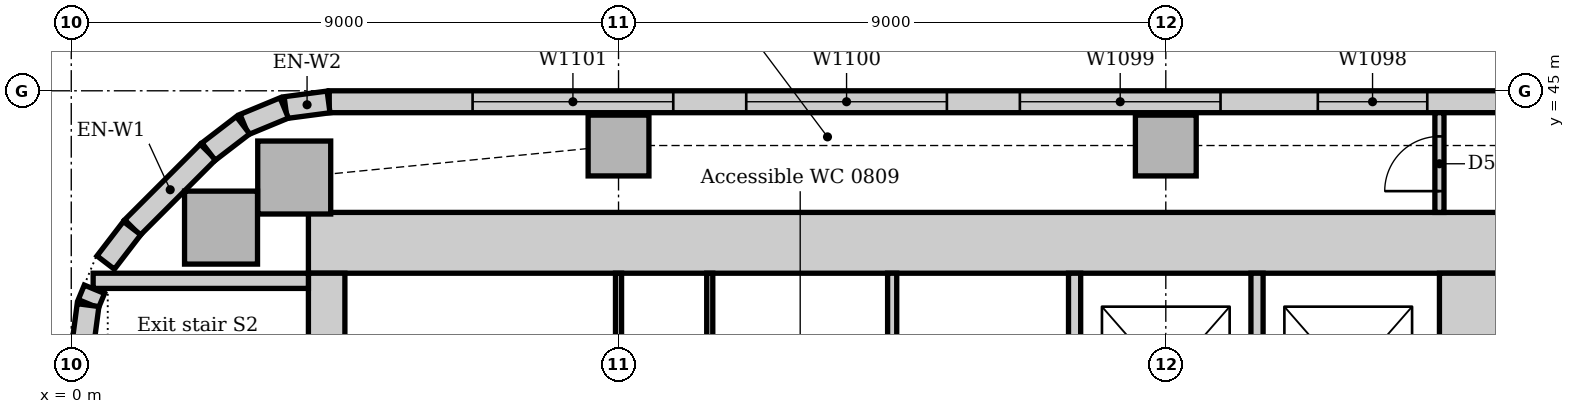
"""IFC4 building model, lengths in metres.
Left out: names, types, materials, properties, quantities, classifications, styles, units other than length and angle.
Written with IfcOpenShell. Run it as: python <this file> out.ifc"""

import sys

from ifc_helpers import new_model, si_unit, direction, frame, frame_2d, origin, origin_2d, place, context, subcontext, project, spatial, rectangle, extrude, element, fill, save


model = new_model("IFC4")
c1 = context("Model", 3, precision=1e-05, world=origin(), true_north=direction((0.0, 1.0)))
c2 = subcontext(c1, "Body", "Model", "MODEL_VIEW")
j1 = project(units=[si_unit("LENGTHUNIT", "METRE"), si_unit("PLANEANGLEUNIT", "RADIAN")], contexts=[c1])
p1 = place(None, origin())
s1 = spatial("IfcSite", under=j1, at=p1, CompositionType="ELEMENT")
p2 = place(p1, origin())
s2 = spatial("IfcBuilding", under=s1, at=p2, CompositionType="ELEMENT")
p3 = place(p2, frame((0.0, 0.0, 38.0)))
s3 = spatial("IfcBuildingStorey", under=s2, at=p3, CompositionType="ELEMENT", Elevation=38.0)
p4 = place(p3, frame((23.5, 42.5, 0.0), z_axis=(0.0, 0.0, 1.0), x_axis=(-1.0, 0.0, 0.0)))
e1 = element("IfcWall", 1, at=p4, inside=s3, PredefinedType="SOLIDWALL", context=c2, shape_type="SweptSolid", body=[
    extrude(rectangle(XDim=19.6, YDim=1.0, at=frame_2d((9.8, 0.0))), origin(), (0.0, 0.0, 1.0), 4.0),
])
p5 = place(p3, frame((23.0, 31.5, 0.0), z_axis=(0.0, 0.0, 1.0), x_axis=(0.0, 1.0, 0.0)))
e2 = element("IfcWall", 2, at=p5, inside=s3, PredefinedType="SOLIDWALL", context=c2, shape_type="SweptSolid", body=[
    extrude(rectangle(XDim=10.5, YDim=1.0, at=frame_2d((5.25, 0.0))), origin(), (0.0, 0.0, 1.0), 4.0),
])
p6 = place(p5, frame((3.15, 0.0, 0.0)))
e3 = element("IfcOpeningElement", 3, at=p6, cuts=e2, PredefinedType="OPENING", context=c2, shape_type="SweptSolid", body=[
    extrude(rectangle(XDim=1.0, YDim=2.1, at=frame_2d((0.5, 1.05))), frame((0.0, 0.51, 0.0), z_axis=(0.0, -1.0, 0.0), x_axis=(1.0, 0.0, 0.0)), (0.0, 0.0, 1.0), 1.02),
])
p7 = place(p5, frame((5.2, 0.0, 0.0)))
e4 = element("IfcOpeningElement", 4, at=p7, cuts=e2, PredefinedType="OPENING", context=c2, shape_type="SweptSolid", body=[
    extrude(rectangle(XDim=1.0, YDim=2.1, at=frame_2d((0.5, 1.05))), frame((0.0, 0.51, 0.0), z_axis=(0.0, -1.0, 0.0), x_axis=(1.0, 0.0, 0.0)), (0.0, 0.0, 1.0), 1.02),
])
p8 = place(p3, frame((4.2, 42.0, 0.0), z_axis=(0.0, 0.0, 1.0), x_axis=(0.0, -1.0, 0.0)))
e5 = element("IfcWall", 5, at=p8, inside=s3, PredefinedType="SOLIDWALL", context=c2, shape_type="SweptSolid", body=[
    extrude(rectangle(XDim=10.5, YDim=0.6, at=frame_2d((5.25, 0.0))), origin(), (0.0, 0.0, 1.0), 4.0),
])
p9 = place(p8, frame((5.3, 0.0, 0.0)))
e6 = element("IfcOpeningElement", 6, at=p9, cuts=e5, PredefinedType="OPENING", context=c2, shape_type="SweptSolid", body=[
    extrude(rectangle(XDim=1.0, YDim=2.1, at=frame_2d((0.5, 1.05))), frame((0.0, 0.31, 0.0), z_axis=(0.0, -1.0, 0.0), x_axis=(1.0, 0.0, 0.0)), (0.0, 0.0, 1.0), 0.62),
])
p10 = place(p3, frame((3.9, 41.875, 0.0), z_axis=(0.0, 0.0, 1.0), x_axis=(-1.0, 0.0, 0.0)))
e7 = element("IfcWall", 7, at=p10, inside=s3, PredefinedType="SOLIDWALL", context=c2, shape_type="SweptSolid", body=[
    extrude(rectangle(XDim=3.54, YDim=0.25, at=frame_2d((1.77, 0.0))), origin(), (0.0, 0.0, 1.0), 4.0),
])
for number, where, z_axis, x_axis in (
    (8, (3.667, 43.574, 0.0), (0.0, 0.0, 1.0), (1.0, 0.0, 0.0)),
    (9, (2.463, 42.75, 0.0), (0.0, 0.0, 1.0), (1.0, 0.0, 0.0)),
):
    element("IfcColumn", number, at=place(p3, frame(where, z_axis=z_axis, x_axis=x_axis)), inside=s3, PredefinedType="COLUMN", context=c2, shape_type="SweptSolid", body=[
        extrude(rectangle(XDim=1.2, YDim=1.2, at=origin_2d()), origin(), (0.0, 0.0, 1.0), 3.85),
    ])
for number, where, z_axis, x_axis in (
    (10, (9.0, 44.1, 0.0), (0.0, 0.0, 1.0), (1.0, 0.0, 0.0)),
    (11, (18.0, 44.1, 0.0), (0.0, 0.0, 1.0), (1.0, 0.0, 0.0)),
):
    element("IfcColumn", number, at=place(p3, frame(where, z_axis=z_axis, x_axis=x_axis)), inside=s3, PredefinedType="COLUMN", context=c2, shape_type="SweptSolid", body=[
        extrude(rectangle(XDim=1.0, YDim=1.0, at=origin_2d()), origin(), (0.0, 0.0, 1.0), 3.85),
    ])
p11 = place(p3, frame((48.257, 44.82, 0.0), z_axis=(0.0, 0.0, 1.0), x_axis=(-1.0, 0.0, 0.0)))
e12 = element("IfcWall", 12, at=p11, inside=s3, PredefinedType="STANDARD", context=c2, shape_type="SweptSolid", body=[
    extrude(rectangle(XDim=44.015, YDim=0.36, at=frame_2d((22.007, 0.0))), origin(), (0.0, 0.0, 1.0), 3.85),
])
p12 = place(p11, frame((2.357, 0.0, 0.9)))
e13 = element("IfcOpeningElement", 13, at=p12, cuts=e12, PredefinedType="OPENING", context=c2, shape_type="SweptSolid", body=[
    extrude(rectangle(XDim=3.3, YDim=1.6, at=frame_2d((1.65, 0.8))), frame((0.0, 0.19, 0.0), z_axis=(0.0, -1.0, 0.0), x_axis=(1.0, 0.0, 0.0)), (0.0, 0.0, 1.0), 0.38),
])
p13 = place(p11, frame((6.857, 0.0, 0.9)))
e14 = element("IfcOpeningElement", 14, at=p13, cuts=e12, PredefinedType="OPENING", context=c2, shape_type="SweptSolid", body=[
    extrude(rectangle(XDim=3.3, YDim=1.6, at=frame_2d((1.65, 0.8))), frame((0.0, 0.19, 0.0), z_axis=(0.0, -1.0, 0.0), x_axis=(1.0, 0.0, 0.0)), (0.0, 0.0, 1.0), 0.38),
])
p14 = place(p11, frame((11.357, 0.0, 0.9)))
e15 = element("IfcOpeningElement", 15, at=p14, cuts=e12, PredefinedType="OPENING", context=c2, shape_type="SweptSolid", body=[
    extrude(rectangle(XDim=3.3, YDim=1.6, at=frame_2d((1.65, 0.8))), frame((0.0, 0.19, 0.0), z_axis=(0.0, -1.0, 0.0), x_axis=(1.0, 0.0, 0.0)), (0.0, 0.0, 1.0), 0.38),
])
p15 = place(p11, frame((15.857, 0.0, 0.9)))
e16 = element("IfcOpeningElement", 16, at=p15, cuts=e12, PredefinedType="OPENING", context=c2, shape_type="SweptSolid", body=[
    extrude(rectangle(XDim=3.3, YDim=1.6, at=frame_2d((1.65, 0.8))), frame((0.0, 0.19, 0.0), z_axis=(0.0, -1.0, 0.0), x_axis=(1.0, 0.0, 0.0)), (0.0, 0.0, 1.0), 0.38),
])
p16 = place(p11, frame((20.357, 0.0, 0.9)))
e17 = element("IfcOpeningElement", 17, at=p16, cuts=e12, PredefinedType="OPENING", context=c2, shape_type="SweptSolid", body=[
    extrude(rectangle(XDim=3.3, YDim=1.6, at=frame_2d((1.65, 0.8))), frame((0.0, 0.19, 0.0), z_axis=(0.0, -1.0, 0.0), x_axis=(1.0, 0.0, 0.0)), (0.0, 0.0, 1.0), 0.38),
])
p17 = place(p11, frame((25.957, 0.0, 0.9)))
e18 = element("IfcOpeningElement", 18, at=p17, cuts=e12, PredefinedType="OPENING", context=c2, shape_type="SweptSolid", body=[
    extrude(rectangle(XDim=1.8, YDim=1.6, at=frame_2d((0.9, 0.8))), frame((0.0, 0.19, 0.0), z_axis=(0.0, -1.0, 0.0), x_axis=(1.0, 0.0, 0.0)), (0.0, 0.0, 1.0), 0.38),
])
p18 = place(p11, frame((29.357, 0.0, 0.9)))
e19 = element("IfcOpeningElement", 19, at=p18, cuts=e12, PredefinedType="OPENING", context=c2, shape_type="SweptSolid", body=[
    extrude(rectangle(XDim=3.3, YDim=1.6, at=frame_2d((1.65, 0.8))), frame((0.0, 0.19, 0.0), z_axis=(0.0, -1.0, 0.0), x_axis=(1.0, 0.0, 0.0)), (0.0, 0.0, 1.0), 0.38),
])
p19 = place(p11, frame((33.857, 0.0, 0.9)))
e20 = element("IfcOpeningElement", 20, at=p19, cuts=e12, PredefinedType="OPENING", context=c2, shape_type="SweptSolid", body=[
    extrude(rectangle(XDim=3.3, YDim=1.6, at=frame_2d((1.65, 0.8))), frame((0.0, 0.19, 0.0), z_axis=(0.0, -1.0, 0.0), x_axis=(1.0, 0.0, 0.0)), (0.0, 0.0, 1.0), 0.38),
])
p20 = place(p11, frame((38.357, 0.0, 0.9)))
e21 = element("IfcOpeningElement", 21, at=p20, cuts=e12, PredefinedType="OPENING", context=c2, shape_type="SweptSolid", body=[
    extrude(rectangle(XDim=3.3, YDim=1.6, at=frame_2d((1.65, 0.8))), frame((0.0, 0.19, 0.0), z_axis=(0.0, -1.0, 0.0), x_axis=(1.0, 0.0, 0.0)), (0.0, 0.0, 1.0), 0.38),
])
p21 = place(p3, frame((2.249, 43.994, 0.0), z_axis=(0.0, 0.0, 1.0), x_axis=(-0.707106781187, -0.707106781187, 0.0)))
e22 = element("IfcWall", 22, at=p21, inside=s3, PredefinedType="STANDARD", context=c2, shape_type="SweptSolid", body=[
    extrude(rectangle(XDim=1.757, YDim=0.36, at=frame_2d((0.879, 0.0))), origin(), (0.0, 0.0, 1.0), 3.85),
])
for number, where, z_axis, x_axis in (
    (23, (4.231, 44.817, 0.0), (0.0, 0.0, 1.0), (-0.991, -0.131, 0.0)),
    (24, (3.503, 44.718, 0.0), (0.0, 0.0, 1.0), (-0.924, -0.383, 0.0)),
):
    element("IfcWall", number, at=place(p3, frame(where, z_axis=z_axis, x_axis=x_axis)), inside=s3, PredefinedType="STANDARD", context=c2, shape_type="SweptSolid", body=[
        extrude(rectangle(XDim=0.713, YDim=0.36, at=frame_2d((0.356, 0.0))), origin(), (0.0, 0.0, 1.0), 3.85),
    ])
for number, where, z_axis, x_axis in (
    (25, (2.825, 44.434, 0.0), (0.0, 0.0, 1.0), (-0.793, -0.609, 0.0)),
    (26, (1.0, 42.741, 0.0), (0.0, 0.0, 1.0), (-0.609, -0.793, 0.0)),
):
    element("IfcWall", number, at=place(p3, frame(where, z_axis=z_axis, x_axis=x_axis)), inside=s3, PredefinedType="STANDARD", context=c2, shape_type="SweptSolid", body=[
        extrude(rectangle(XDim=0.713, YDim=0.36, at=frame_2d((0.357, 0.0))), origin(), (0.0, 0.0, 1.0), 3.85),
    ])
p22 = place(p3, frame((0.381, 41.736, 0.0), z_axis=(0.0, 0.0, 1.0), x_axis=(-0.382773360986, -0.923842277729, 0.0)))
e27 = element("IfcWall", 27, at=p22, inside=s3, PredefinedType="STANDARD", context=c2, shape_type="SweptSolid", body=[
    extrude(rectangle(XDim=0.258, YDim=0.36, at=frame_2d((0.129, 0.0))), origin(), (0.0, 0.0, 1.0), 3.85),
])
p23 = place(p3, frame((0.276, 41.476, 0.0), z_axis=(0.0, 0.0, 1.0), x_axis=(-0.13055608231, -0.99144092581, 0.0)))
e28 = element("IfcWall", 28, at=p23, inside=s3, PredefinedType="STANDARD", context=c2, shape_type="SweptSolid", body=[
    extrude(rectangle(XDim=0.713, YDim=0.36, at=frame_2d((0.356, 0.0))), origin(), (0.0, 0.0, 1.0), 3.85),
])
for number, where, z_axis, x_axis in (
    (29, (16.5, 38.6, 0.0), (0.0, 0.0, 1.0), (0.0, 1.0, 0.0)),
    (30, (19.5, 38.6, 0.0), (0.0, 0.0, 1.0), (0.0, 1.0, 0.0)),
):
    element("IfcWall", number, at=place(p3, frame(where, z_axis=z_axis, x_axis=x_axis)), inside=s3, PredefinedType="PARTITIONING", context=c2, shape_type="SweptSolid", body=[
        extrude(rectangle(XDim=3.4, YDim=0.2, at=frame_2d((1.7, 0.0))), origin(), (0.0, 0.0, 1.0), 3.85),
    ])
p24 = place(p3, frame((22.5, 43.0, 0.0), z_axis=(0.0, 0.0, 1.0), x_axis=(0.0, 1.0, 0.0)))
e31 = element("IfcWall", 31, at=p24, inside=s3, PredefinedType="PARTITIONING", context=c2, shape_type="SweptSolid", body=[
    extrude(rectangle(XDim=1.64, YDim=0.15, at=frame_2d((0.82, 0.0))), origin(), (0.0, 0.0, 1.0), 3.85),
])
p25 = place(p24, frame((0.35, 0.0, 0.0)))
e32 = element("IfcOpeningElement", 32, at=p25, cuts=e31, PredefinedType="OPENING", context=c2, shape_type="SweptSolid", body=[
    extrude(rectangle(XDim=0.9, YDim=2.1, at=frame_2d((0.45, 1.05))), frame((0.0, 0.085, 0.0), z_axis=(0.0, -1.0, 0.0), x_axis=(1.0, 0.0, 0.0)), (0.0, 0.0, 1.0), 0.17),
])
p26 = place(p3, frame((13.5, 38.575, 0.0), z_axis=(0.0, 0.0, 1.0), x_axis=(0.0, 1.0, 0.0)))
e33 = element("IfcWall", 33, at=p26, inside=s3, PredefinedType="PARTITIONING", context=c2, shape_type="SweptSolid", body=[
    extrude(rectangle(XDim=3.425, YDim=0.15, at=frame_2d((1.712, 0.0))), origin(), (0.0, 0.0, 1.0), 3.85),
])
for number, where, z_axis, x_axis in (
    (34, (9.0, 38.575, 0.0), (0.0, 0.0, 1.0), (0.0, 1.0, 0.0)),
    (35, (10.5, 38.575, 0.0), (0.0, 0.0, 1.0), (0.0, 1.0, 0.0)),
):
    element("IfcWall", number, at=place(p3, frame(where, z_axis=z_axis, x_axis=x_axis)), inside=s3, PredefinedType="PARTITIONING", context=c2, shape_type="SweptSolid", body=[
        extrude(rectangle(XDim=3.425, YDim=0.1, at=frame_2d((1.712, 0.0))), origin(), (0.0, 0.0, 1.0), 3.85),
    ])
p27 = place(p17, origin())
e36 = element("IfcWindow", 36, at=p27, inside=s3, PartitioningType="SINGLE_PANEL", PredefinedType="WINDOW", context=c2, shape_type="SweptSolid", body=[
    extrude(rectangle(XDim=1.8, YDim=1.6, at=frame_2d((0.9, 0.8))), frame((0.0, 0.13, 0.0), z_axis=(0.0, -1.0, 0.0), x_axis=(1.0, 0.0, 0.0)), (0.0, 0.0, 1.0), 0.06),
])
fill(e18, e36)
p28 = place(p18, origin())
e37 = element("IfcWindow", 37, at=p28, inside=s3, PartitioningType="SINGLE_PANEL", PredefinedType="WINDOW", context=c2, shape_type="SweptSolid", body=[
    extrude(rectangle(XDim=3.3, YDim=1.6, at=frame_2d((1.65, 0.8))), frame((0.0, 0.13, 0.0), z_axis=(0.0, -1.0, 0.0), x_axis=(1.0, 0.0, 0.0)), (0.0, 0.0, 1.0), 0.06),
])
fill(e19, e37)
p29 = place(p19, origin())
e38 = element("IfcWindow", 38, at=p29, inside=s3, PartitioningType="SINGLE_PANEL", PredefinedType="WINDOW", context=c2, shape_type="SweptSolid", body=[
    extrude(rectangle(XDim=3.3, YDim=1.6, at=frame_2d((1.65, 0.8))), frame((0.0, 0.13, 0.0), z_axis=(0.0, -1.0, 0.0), x_axis=(1.0, 0.0, 0.0)), (0.0, 0.0, 1.0), 0.06),
])
fill(e20, e38)
p30 = place(p20, origin())
e39 = element("IfcWindow", 39, at=p30, inside=s3, PartitioningType="SINGLE_PANEL", PredefinedType="WINDOW", context=c2, shape_type="SweptSolid", body=[
    extrude(rectangle(XDim=3.3, YDim=1.6, at=frame_2d((1.65, 0.8))), frame((0.0, 0.13, 0.0), z_axis=(0.0, -1.0, 0.0), x_axis=(1.0, 0.0, 0.0)), (0.0, 0.0, 1.0), 0.06),
])
fill(e21, e39)
p31 = place(p25, origin())
e40 = element("IfcDoor", 40, at=p31, inside=s3, OperationType="SINGLE_SWING_LEFT", PredefinedType="DOOR", context=c2, shape_type="SweptSolid", body=[
    extrude(rectangle(XDim=0.9, YDim=2.1, at=frame_2d((0.45, 1.05))), frame((0.0, 0.025, 0.0), z_axis=(0.0, -1.0, 0.0), x_axis=(1.0, 0.0, 0.0)), (0.0, 0.0, 1.0), 0.05),
])
fill(e32, e40)
save(model, sys.argv[1])
